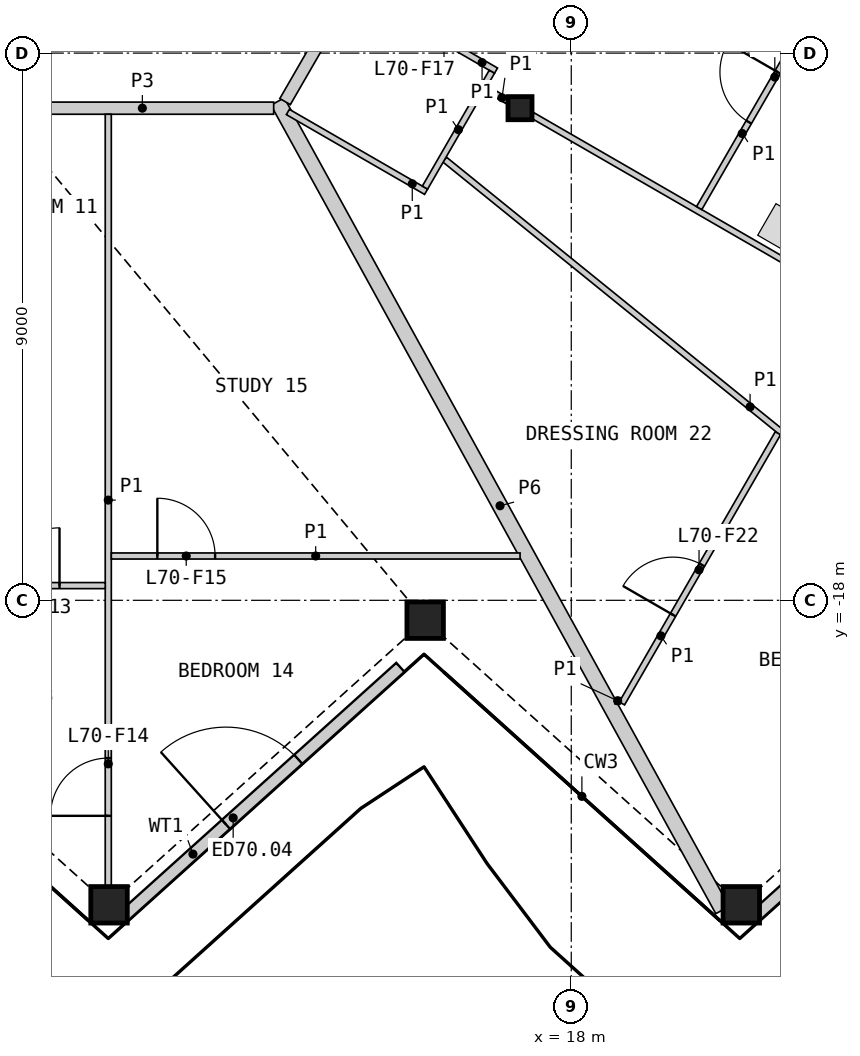
"""IFC4 building model, lengths in metres.
Left out: names, types, materials, properties, quantities, classifications, styles, units other than length and angle.
Written with IfcOpenShell. Run it as: python <this file> out.ifc"""

import sys

from ifc_helpers import new_model, si_unit, direction, frame, frame_2d, origin, origin_2d, place, context, subcontext, project, spatial, rectangle, hollow_rectangle, i_section, extrude, element, fill, save


model = new_model("IFC4")
c1 = context("Model", 3, precision=1e-05, world=origin(), true_north=direction((0.0, 1.0)))
c2 = subcontext(c1, "Body", "Model", "MODEL_VIEW")
j1 = project(units=[si_unit("LENGTHUNIT", "METRE"), si_unit("PLANEANGLEUNIT", "RADIAN")], contexts=[c1])
p1 = place(None, origin())
s1 = spatial("IfcSite", under=j1, at=p1, CompositionType="ELEMENT")
p2 = place(p1, origin())
s2 = spatial("IfcBuilding", under=s1, at=p2, CompositionType="ELEMENT")
p3 = place(p2, frame((0.0, 0.0, 318.8)))
s3 = spatial("IfcBuildingStorey", under=s2, at=p3, CompositionType="ELEMENT", Elevation=318.8)
for number, where, z_axis, x_axis in (
    (1, (10.398, -23.008, 0.0), (0.0, 0.0, 1.0), (1.0, 0.0, 0.0)),
    (2, (15.597, -18.327, 0.0), (0.0, 0.0, 1.0), (1.0, 0.0, 0.0)),
    (3, (20.796, -23.008, 0.0), (0.0, 0.0, 1.0), (1.0, 0.0, 0.0)),
):
    element("IfcColumn", number, at=place(p3, frame(where, z_axis=z_axis, x_axis=x_axis)), inside=s3, PredefinedType="COLUMN", context=c2, shape_type="SweptSolid", body=[
        extrude(hollow_rectangle(XDim=0.6, YDim=0.6, WallThickness=0.04, at=origin_2d()), origin(), (0.0, 0.0, 1.0), 3.4),
    ])
p4 = place(p3, frame((17.157, -9.906, 0.0), z_axis=(0.0, 0.0, 1.0), x_axis=(1.0, 0.0, 0.0)))
e4 = element("IfcColumn", 4, at=p4, inside=s3, PredefinedType="COLUMN", context=c2, shape_type="SweptSolid", body=[
    extrude(i_section(OverallWidth=0.396, OverallDepth=0.381, WebThickness=0.019, FlangeThickness=0.03, at=origin_2d()), origin(), (0.0, 0.0, 1.0), 3.4),
])
p5 = place(p3, frame((10.641, -23.198, 0.0), z_axis=(0.0, 0.0, 1.0), x_axis=(0.743121537674, 0.66915646918, 0.0)))
e5 = element("IfcWall", 5, at=p5, inside=s3, PredefinedType="SOLIDWALL", context=c2, shape_type="SweptSolid", body=[
    extrude(rectangle(XDim=6.12, YDim=0.2, at=frame_2d((3.06, 0.0))), origin(), (0.0, 0.0, 1.0), 2.488),
])
p6 = place(p5, frame((2.26, 0.0, 0.0)))
e6 = element("IfcOpeningElement", 6, at=p6, cuts=e5, PredefinedType="OPENING", context=c2, shape_type="SweptSolid", body=[
    extrude(rectangle(XDim=1.6, YDim=2.25, at=frame_2d((0.8, 1.125))), frame((0.0, 0.11, 0.0), z_axis=(0.0, -1.0, 0.0), x_axis=(1.0, 0.0, 0.0)), (0.0, 0.0, 1.0), 0.22),
])
p7 = place(p3, frame((21.027, -23.198, 0.0), z_axis=(0.0, 0.0, 1.0), x_axis=(0.74314788005, 0.669127213897, 0.0)))
e7 = element("IfcWall", 7, at=p7, inside=s3, PredefinedType="SOLIDWALL", context=c2, shape_type="SweptSolid", body=[
    extrude(rectangle(XDim=6.475, YDim=0.2, at=frame_2d((3.237, 0.0))), origin(), (0.0, 0.0, 1.0), 2.488),
])
p8 = place(p7, frame((2.26, 0.0, 0.0)))
e8 = element("IfcOpeningElement", 8, at=p8, cuts=e7, PredefinedType="OPENING", context=c2, shape_type="SweptSolid", body=[
    extrude(rectangle(XDim=1.6, YDim=2.25, at=frame_2d((0.8, 1.125))), frame((0.0, 0.11, 0.0), z_axis=(0.0, -1.0, 0.0), x_axis=(1.0, 0.0, 0.0)), (0.0, 0.0, 1.0), 0.22),
])
p9 = place(p3, frame((13.171, -9.796, 0.0), z_axis=(0.0, 0.0, 1.0), x_axis=(0.481999020381, -0.876171755053, 0.0)))
e9 = element("IfcWall", 9, at=p9, inside=s3, PredefinedType="PARTITIONING", context=c2, shape_type="SweptSolid", body=[
    extrude(rectangle(XDim=15.178, YDim=0.25, at=frame_2d((7.589, 0.0))), origin(), (0.0, 0.0, 1.0), 2.33),
])
p10 = place(p3, frame((8.786, -9.906, 0.0), z_axis=(0.0, 0.0, 1.0), x_axis=(1.0, 0.0, 0.0)))
e10 = element("IfcWall", 10, at=p10, inside=s3, PredefinedType="PARTITIONING", context=c2, shape_type="SweptSolid", body=[
    extrude(rectangle(XDim=4.32, YDim=0.2, at=frame_2d((2.16, 0.0))), origin(), (0.0, 0.0, 1.0), 3.1),
])
p11 = place(p3, frame((13.293, -9.797, 0.0), z_axis=(0.0, 0.0, 1.0), x_axis=(0.499967746641, 0.866044024469, 0.0)))
e11 = element("IfcWall", 11, at=p11, inside=s3, PredefinedType="PARTITIONING", context=c2, shape_type="SweptSolid", body=[
    extrude(rectangle(XDim=3.676, YDim=0.2, at=frame_2d((1.838, 0.0))), origin(), (0.0, 0.0, 1.0), 3.1),
])
p12 = place(p11, frame((2.426, 0.0, 0.0)))
e12 = element("IfcOpeningElement", 12, at=p12, cuts=e11, PredefinedType="OPENING", context=c2, shape_type="SweptSolid", body=[
    extrude(rectangle(XDim=1.0, YDim=2.1, at=frame_2d((0.5, 1.05))), frame((0.0, 0.11, 0.0), z_axis=(0.0, -1.0, 0.0), x_axis=(1.0, 0.0, 0.0)), (0.0, 0.0, 1.0), 0.22),
])
p13 = place(p3, frame((15.917, -10.751, 0.0), z_axis=(0.0, 0.0, 1.0), x_axis=(0.777149866095, -0.629315569193, 0.0)))
e13 = element("IfcWall", 13, at=p13, inside=s3, PredefinedType="PARTITIONING", context=c2, shape_type="SweptSolid", body=[
    extrude(rectangle(XDim=12.927, YDim=0.1, at=frame_2d((6.464, 0.0))), origin(), (0.0, 0.0, 1.0), 2.33),
])
p14 = place(p13, frame((7.298, 0.0, 0.0)))
e14 = element("IfcOpeningElement", 14, at=p14, cuts=e13, PredefinedType="OPENING", context=c2, shape_type="SweptSolid", body=[
    extrude(rectangle(XDim=0.95, YDim=2.1, at=frame_2d((0.475, 1.05))), frame((0.0, 0.06, 0.0), z_axis=(0.0, -1.0, 0.0), x_axis=(1.0, 0.0, 0.0)), (0.0, 0.0, 1.0), 0.12),
])
p15 = place(p3, frame((10.385, -22.698, 0.0), z_axis=(0.0, 0.0, 1.0), x_axis=(0.0, 1.0, 0.0)))
e15 = element("IfcWall", 15, at=p15, inside=s3, PredefinedType="PARTITIONING", context=c2, shape_type="SweptSolid", body=[
    extrude(rectangle(XDim=12.692, YDim=0.1, at=frame_2d((6.346, 0.0))), origin(), (0.0, 0.0, 1.0), 2.33),
])
p16 = place(p15, frame((1.153, 0.0, 0.0)))
e16 = element("IfcOpeningElement", 16, at=p16, cuts=e15, PredefinedType="OPENING", context=c2, shape_type="SweptSolid", body=[
    extrude(rectangle(XDim=0.95, YDim=2.1, at=frame_2d((0.475, 1.05))), frame((0.0, 0.06, 0.0), z_axis=(0.0, -1.0, 0.0), x_axis=(1.0, 0.0, 0.0)), (0.0, 0.0, 1.0), 0.12),
])
p17 = place(p3, frame((17.365, -10.025, 0.0), z_axis=(0.0, 0.0, 1.0), x_axis=(0.866021046153, -0.500007547564, 0.0)))
e17 = element("IfcWall", 17, at=p17, inside=s3, PredefinedType="PARTITIONING", context=c2, shape_type="SweptSolid", body=[
    extrude(rectangle(XDim=11.267, YDim=0.1, at=frame_2d((5.634, 0.0))), origin(), (0.0, 0.0, 1.0), 2.33),
])
p18 = place(p17, frame((8.364, 0.0, 0.0)))
e18 = element("IfcOpeningElement", 18, at=p18, cuts=e17, PredefinedType="OPENING", context=c2, shape_type="SweptSolid", body=[
    extrude(rectangle(XDim=0.95, YDim=2.1, at=frame_2d((0.475, 1.05))), frame((0.0, 0.06, 0.0), z_axis=(0.0, -1.0, 0.0), x_axis=(1.0, 0.0, 0.0)), (0.0, 0.0, 1.0), 0.12),
])
p19 = place(p3, frame((0.05, -17.758, 0.0), z_axis=(0.0, 0.0, 1.0), x_axis=(1.0, 0.0, 0.0)))
e19 = element("IfcWall", 19, at=p19, inside=s3, PredefinedType="PARTITIONING", context=c2, shape_type="SweptSolid", body=[
    extrude(rectangle(XDim=10.286, YDim=0.1, at=frame_2d((5.143, 0.0))), origin(), (0.0, 0.0, 1.0), 2.33),
])
p20 = place(p19, frame((0.752, 0.0, 0.0)))
e20 = element("IfcOpeningElement", 20, at=p20, cuts=e19, PredefinedType="OPENING", context=c2, shape_type="SweptSolid", body=[
    extrude(rectangle(XDim=0.95, YDim=2.1, at=frame_2d((0.475, 1.05))), frame((0.0, 0.06, 0.0), z_axis=(0.0, -1.0, 0.0), x_axis=(1.0, 0.0, 0.0)), (0.0, 0.0, 1.0), 0.12),
])
p21 = place(p19, frame((8.584, 0.0, 0.0)))
e21 = element("IfcOpeningElement", 21, at=p21, cuts=e19, PredefinedType="OPENING", context=c2, shape_type="SweptSolid", body=[
    extrude(rectangle(XDim=0.95, YDim=2.1, at=frame_2d((0.475, 1.05))), frame((0.0, 0.06, 0.0), z_axis=(0.0, -1.0, 0.0), x_axis=(1.0, 0.0, 0.0)), (0.0, 0.0, 1.0), 0.12),
])
p22 = place(p3, frame((10.436, -17.271, 0.0), z_axis=(0.0, 0.0, 1.0), x_axis=(1.0, 0.0, 0.0)))
e22 = element("IfcWall", 22, at=p22, inside=s3, PredefinedType="PARTITIONING", context=c2, shape_type="SweptSolid", body=[
    extrude(rectangle(XDim=6.722, YDim=0.1, at=frame_2d((3.361, 0.0))), origin(), (0.0, 0.0, 1.0), 2.33),
])
p23 = place(p22, frame((0.757, 0.0, 0.0)))
e23 = element("IfcOpeningElement", 23, at=p23, cuts=e22, PredefinedType="OPENING", context=c2, shape_type="SweptSolid", body=[
    extrude(rectangle(XDim=0.95, YDim=2.1, at=frame_2d((0.475, 1.05))), frame((0.0, 0.06, 0.0), z_axis=(0.0, -1.0, 0.0), x_axis=(1.0, 0.0, 0.0)), (0.0, 0.0, 1.0), 0.12),
])
p24 = place(p3, frame((18.833, -19.695, 0.0), z_axis=(0.0, 0.0, 1.0), x_axis=(0.500034163155, 0.866005678779, 0.0)))
e24 = element("IfcWall", 24, at=p24, inside=s3, PredefinedType="PARTITIONING", context=c2, shape_type="SweptSolid", body=[
    extrude(rectangle(XDim=5.13, YDim=0.1, at=frame_2d((2.565, 0.0))), origin(), (0.0, 0.0, 1.0), 2.33),
])
p25 = place(p24, frame((1.681, 0.0, 0.0)))
e25 = element("IfcOpeningElement", 25, at=p25, cuts=e24, PredefinedType="OPENING", context=c2, shape_type="SweptSolid", body=[
    extrude(rectangle(XDim=0.95, YDim=2.1, at=frame_2d((0.475, 1.05))), frame((0.0, 0.06, 0.0), z_axis=(0.0, -1.0, 0.0), x_axis=(1.0, 0.0, 0.0)), (0.0, 0.0, 1.0), 0.12),
])
p26 = place(p3, frame((20.104, -11.549, 0.0), z_axis=(0.0, 0.0, 1.0), x_axis=(0.499976073514, 0.866039217307, 0.0)))
e26 = element("IfcWall", 26, at=p26, inside=s3, PredefinedType="PARTITIONING", context=c2, shape_type="SweptSolid", body=[
    extrude(rectangle(XDim=2.833, YDim=0.1, at=frame_2d((1.417, 0.0))), origin(), (0.0, 0.0, 1.0), 2.33),
])
p27 = place(p26, frame((1.633, 0.0, 0.0)))
e27 = element("IfcOpeningElement", 27, at=p27, cuts=e26, PredefinedType="OPENING", context=c2, shape_type="SweptSolid", body=[
    extrude(rectangle(XDim=0.95, YDim=2.1, at=frame_2d((0.475, 1.05))), frame((0.0, 0.06, 0.0), z_axis=(0.0, -1.0, 0.0), x_axis=(1.0, 0.0, 0.0)), (0.0, 0.0, 1.0), 0.12),
])
p28 = place(p3, frame((14.468, -7.964, 0.0), z_axis=(0.0, 0.0, 1.0), x_axis=(0.865989200783, -0.500062700197, 0.0)))
e28 = element("IfcWall", 28, at=p28, inside=s3, PredefinedType="PARTITIONING", context=c2, shape_type="SweptSolid", body=[
    extrude(rectangle(XDim=2.65, YDim=0.1, at=frame_2d((1.325, 0.0))), origin(), (0.0, 0.0, 1.0), 2.33),
])
p29 = place(p28, frame((0.95, 0.0, 0.0)))
e29 = element("IfcOpeningElement", 29, at=p29, cuts=e28, PredefinedType="OPENING", context=c2, shape_type="SweptSolid", body=[
    extrude(rectangle(XDim=0.95, YDim=2.1, at=frame_2d((0.475, 1.05))), frame((0.0, 0.06, 0.0), z_axis=(0.0, -1.0, 0.0), x_axis=(1.0, 0.0, 0.0)), (0.0, 0.0, 1.0), 0.12),
])
p30 = place(p3, frame((13.339, -9.968, 0.0), z_axis=(0.0, 0.0, 1.0), x_axis=(0.866013657776, -0.500020344131, 0.0)))
e30 = element("IfcWall", 30, at=p30, inside=s3, PredefinedType="PARTITIONING", context=c2, shape_type="SweptSolid", body=[
    extrude(rectangle(XDim=2.625, YDim=0.1, at=frame_2d((1.312, 0.0))), origin(), (0.0, 0.0, 1.0), 2.33),
])
p31 = place(p3, frame((15.594, -11.212, 0.0), z_axis=(0.0, 0.0, 1.0), x_axis=(0.499981787252, 0.866035918664, 0.0)))
e31 = element("IfcWall", 31, at=p31, inside=s3, PredefinedType="PARTITIONING", context=c2, shape_type="SweptSolid", body=[
    extrude(rectangle(XDim=2.2, YDim=0.1, at=frame_2d((1.1, 0.0))), origin(), (0.0, 0.0, 1.0), 2.33),
])
p32 = place(p3, frame((16.594, -9.581, 0.0), z_axis=(0.0, 0.0, 1.0), x_axis=(0.866036909293, -0.499980071345, 0.0)))
e32 = element("IfcWall", 32, at=p32, inside=s3, PredefinedType="PARTITIONING", context=c2, shape_type="SweptSolid", body=[
    extrude(rectangle(XDim=0.41, YDim=0.1, at=frame_2d((0.205, 0.0))), origin(), (0.0, 0.0, 1.0), 2.33),
])
p33 = place(p3, frame((18.718, -19.652, 0.0), z_axis=(0.0, 0.0, 1.0), x_axis=(1.0, 0.0, 0.0)))
e33 = element("IfcWall", 33, at=p33, inside=s3, PredefinedType="PARTITIONING", context=c2, shape_type="SweptSolid", body=[
    extrude(rectangle(XDim=0.09, YDim=0.1, at=frame_2d((0.045, 0.0))), origin(), (0.0, 0.0, 1.0), 2.33),
])
p34 = place(p6, origin())
e34 = element("IfcDoor", 34, at=p34, inside=s3, OperationType="DOUBLE_DOOR_SINGLE_SWING", PredefinedType="DOOR", context=c2, shape_type="SweptSolid", body=[
    extrude(rectangle(XDim=1.6, YDim=2.25, at=frame_2d((0.8, 1.125))), frame((0.0, 0.025, 0.0), z_axis=(0.0, -1.0, 0.0), x_axis=(1.0, 0.0, 0.0)), (0.0, 0.0, 1.0), 0.05),
])
fill(e6, e34)
p35 = place(p21, origin())
e35 = element("IfcDoor", 35, at=p35, inside=s3, OperationType="SINGLE_SWING_RIGHT", PredefinedType="DOOR", context=c2, shape_type="SweptSolid", body=[
    extrude(rectangle(XDim=0.95, YDim=2.1, at=frame_2d((0.475, 1.05))), frame((0.0, 0.025, 0.0), z_axis=(0.0, -1.0, 0.0), x_axis=(1.0, 0.0, 0.0)), (0.0, 0.0, 1.0), 0.05),
])
fill(e21, e35)
p36 = place(p16, origin())
e36 = element("IfcDoor", 36, at=p36, inside=s3, OperationType="SINGLE_SWING_LEFT", PredefinedType="DOOR", context=c2, shape_type="SweptSolid", body=[
    extrude(rectangle(XDim=0.95, YDim=2.1, at=frame_2d((0.475, 1.05))), frame((0.0, 0.025, 0.0), z_axis=(0.0, -1.0, 0.0), x_axis=(1.0, 0.0, 0.0)), (0.0, 0.0, 1.0), 0.05),
])
fill(e16, e36)
p37 = place(p23, origin())
e37 = element("IfcDoor", 37, at=p37, inside=s3, OperationType="SINGLE_SWING_LEFT", PredefinedType="DOOR", context=c2, shape_type="SweptSolid", body=[
    extrude(rectangle(XDim=0.95, YDim=2.1, at=frame_2d((0.475, 1.05))), frame((0.0, 0.025, 0.0), z_axis=(0.0, -1.0, 0.0), x_axis=(1.0, 0.0, 0.0)), (0.0, 0.0, 1.0), 0.05),
])
fill(e23, e37)
p38 = place(p27, origin())
e38 = element("IfcDoor", 38, at=p38, inside=s3, OperationType="SINGLE_SWING_RIGHT", PredefinedType="DOOR", context=c2, shape_type="SweptSolid", body=[
    extrude(rectangle(XDim=0.95, YDim=2.1, at=frame_2d((0.475, 1.05))), frame((0.0, 0.025, 0.0), z_axis=(0.0, -1.0, 0.0), x_axis=(1.0, 0.0, 0.0)), (0.0, 0.0, 1.0), 0.05),
])
fill(e27, e38)
p39 = place(p25, origin())
e39 = element("IfcDoor", 39, at=p39, inside=s3, OperationType="SINGLE_SWING_LEFT", PredefinedType="DOOR", context=c2, shape_type="SweptSolid", body=[
    extrude(rectangle(XDim=0.95, YDim=2.1, at=frame_2d((0.475, 1.05))), frame((0.0, 0.025, 0.0), z_axis=(0.0, -1.0, 0.0), x_axis=(1.0, 0.0, 0.0)), (0.0, 0.0, 1.0), 0.05),
])
fill(e25, e39)
save(model, sys.argv[1])
